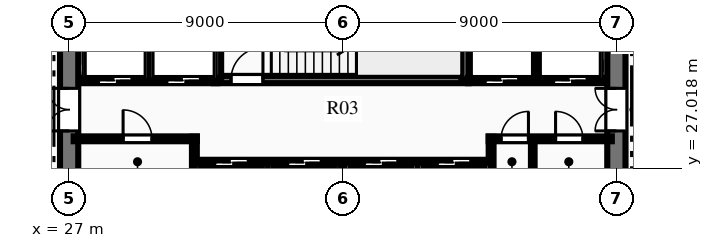
"""IFC4 building model, lengths in metres.
Left out: names, types, materials, properties, quantities, classifications, styles, units other than length and angle.
Written with IfcOpenShell. Run it as: python <this file> out.ifc"""

import sys

from ifc_helpers import new_model, si_unit, direction, frame, frame_2d, origin, place, context, subcontext, project, spatial, rectangle, extrude, element, fill, save


model = new_model("IFC4")
c1 = context("Model", 3, precision=1e-05, world=origin(), true_north=direction((0.0, 1.0)))
c2 = subcontext(c1, "Body", "Model", "MODEL_VIEW")
j1 = project(units=[si_unit("LENGTHUNIT", "METRE"), si_unit("PLANEANGLEUNIT", "RADIAN")], contexts=[c1])
p1 = place(None, origin())
s1 = spatial("IfcSite", under=j1, at=p1, CompositionType="ELEMENT")
p2 = place(p1, origin())
s2 = spatial("IfcBuilding", under=s1, at=p2, CompositionType="ELEMENT")
p3 = place(p2, frame((0.0, 0.0, 32.7)))
s3 = spatial("IfcBuildingStorey", under=s2, at=p3, CompositionType="ELEMENT", Elevation=32.7)
p4 = place(p3, frame((27.0, 18.3, 0.0), z_axis=(0.0, 0.0, 1.0), x_axis=(0.0, 1.0, 0.0)))
e1 = element("IfcWall", 1, at=p4, inside=s3, PredefinedType="SHEAR", context=c2, shape_type="SweptSolid", body=[
    extrude(rectangle(XDim=15.4, YDim=0.6, at=frame_2d((7.7, 0.0))), origin(), (0.0, 0.0, 1.0), 3.75),
])
p5 = place(p4, frame((9.94, 0.0, 0.0)))
e2 = element("IfcOpeningElement", 2, at=p5, cuts=e1, PredefinedType="OPENING", context=c2, shape_type="SweptSolid", body=[
    extrude(rectangle(XDim=1.4, YDim=2.2, at=frame_2d((0.7, 1.1))), frame((0.0, 0.31, 0.0), z_axis=(0.0, -1.0, 0.0), x_axis=(1.0, 0.0, 0.0)), (0.0, 0.0, 1.0), 0.62),
])
p6 = place(p3, frame((45.0, 18.3, 0.0), z_axis=(0.0, 0.0, 1.0), x_axis=(0.0, 1.0, 0.0)))
e3 = element("IfcWall", 3, at=p6, inside=s3, PredefinedType="SHEAR", context=c2, shape_type="SweptSolid", body=[
    extrude(rectangle(XDim=15.4, YDim=0.6, at=frame_2d((7.7, 0.0))), origin(), (0.0, 0.0, 1.0), 3.75),
])
p7 = place(p6, frame((9.94, 0.0, 0.0)))
e4 = element("IfcOpeningElement", 4, at=p7, cuts=e3, PredefinedType="OPENING", context=c2, shape_type="SweptSolid", body=[
    extrude(rectangle(XDim=1.4, YDim=2.2, at=frame_2d((0.7, 1.1))), frame((0.0, 0.31, 0.0), z_axis=(0.0, -1.0, 0.0), x_axis=(1.0, 0.0, 0.0)), (0.0, 0.0, 1.0), 0.62),
])
p8 = place(p3, frame((31.76, 29.93, 0.0), z_axis=(0.0, 0.0, 1.0), x_axis=(1.0, 0.0, 0.0)))
e5 = element("IfcWall", 5, at=p8, inside=s3, PredefinedType="SHEAR", context=c2, shape_type="SweptSolid", body=[
    extrude(rectangle(XDim=8.38, YDim=0.24, at=frame_2d((4.19, 0.0))), origin(), (0.0, 0.0, 1.0), 3.75),
])
p9 = place(p8, frame((0.565, 0.0, 0.0)))
e6 = element("IfcOpeningElement", 6, at=p9, cuts=e5, PredefinedType="OPENING", context=c2, shape_type="SweptSolid", body=[
    extrude(rectangle(XDim=1.05, YDim=2.15, at=frame_2d((0.525, 1.075))), frame((0.0, 0.13, 0.0), z_axis=(0.0, -1.0, 0.0), x_axis=(1.0, 0.0, 0.0)), (0.0, 0.0, 1.0), 0.26),
])
p10 = place(p3, frame((31.88, 29.93, 0.0), z_axis=(0.0, 0.0, 1.0), x_axis=(0.0, 1.0, 0.0)))
e7 = element("IfcWall", 7, at=p10, inside=s3, PredefinedType="SHEAR", context=c2, shape_type="SweptSolid", body=[
    extrude(rectangle(XDim=3.79, YDim=0.24, at=frame_2d((1.895, 0.0))), origin(), (0.0, 0.0, 1.0), 3.75),
])
p11 = place(p3, frame((40.02, 29.93, 0.0), z_axis=(0.0, 0.0, 1.0), x_axis=(0.0, 1.0, 0.0)))
e8 = element("IfcWall", 8, at=p11, inside=s3, PredefinedType="SHEAR", context=c2, shape_type="SweptSolid", body=[
    extrude(rectangle(XDim=3.85, YDim=0.24, at=frame_2d((1.925, 0.0))), origin(), (0.0, 0.0, 1.0), 3.75),
])
p12 = place(p3, frame((27.15, 27.98, 0.0), z_axis=(0.0, 0.0, 1.0), x_axis=(1.0, 0.0, 0.0)))
e9 = element("IfcWall", 9, at=p12, inside=s3, PredefinedType="PARTITIONING", context=c2, shape_type="SweptSolid", body=[
    extrude(rectangle(XDim=4.05, YDim=0.16, at=frame_2d((2.025, 0.0))), origin(), (0.0, 0.0, 1.0), 3.44),
])
p13 = place(p12, frame((1.625, 0.0, 0.0)))
e10 = element("IfcOpeningElement", 10, at=p13, cuts=e9, PredefinedType="OPENING", context=c2, shape_type="SweptSolid", body=[
    extrude(rectangle(XDim=0.95, YDim=2.15, at=frame_2d((0.475, 1.075))), frame((0.0, 0.09, 0.0), z_axis=(0.0, -1.0, 0.0), x_axis=(1.0, 0.0, 0.0)), (0.0, 0.0, 1.0), 0.18),
])
p14 = place(p3, frame((31.12, 26.54, 0.0), z_axis=(0.0, 0.0, 1.0), x_axis=(0.0, 1.0, 0.0)))
e11 = element("IfcWall", 11, at=p14, inside=s3, PredefinedType="PARTITIONING", context=c2, shape_type="SweptSolid", body=[
    extrude(rectangle(XDim=1.51, YDim=0.16, at=frame_2d((0.755, 0.0))), origin(), (0.0, 0.0, 1.0), 3.44),
])
p15 = place(p3, frame((40.8, 27.98, 0.0), z_axis=(0.0, 0.0, 1.0), x_axis=(1.0, 0.0, 0.0)))
e12 = element("IfcWall", 12, at=p15, inside=s3, PredefinedType="PARTITIONING", context=c2, shape_type="SweptSolid", body=[
    extrude(rectangle(XDim=4.05, YDim=0.16, at=frame_2d((2.025, 0.0))), origin(), (0.0, 0.0, 1.0), 3.44),
])
p16 = place(p15, frame((0.407, 0.0, 0.0)))
e13 = element("IfcOpeningElement", 13, at=p16, cuts=e12, PredefinedType="OPENING", context=c2, shape_type="SweptSolid", body=[
    extrude(rectangle(XDim=0.9, YDim=2.15, at=frame_2d((0.45, 1.075))), frame((0.0, 0.09, 0.0), z_axis=(0.0, -1.0, 0.0), x_axis=(1.0, 0.0, 0.0)), (0.0, 0.0, 1.0), 0.18),
])
p17 = place(p15, frame((2.2, 0.0, 0.0)))
e14 = element("IfcOpeningElement", 14, at=p17, cuts=e12, PredefinedType="OPENING", context=c2, shape_type="SweptSolid", body=[
    extrude(rectangle(XDim=0.9, YDim=2.15, at=frame_2d((0.45, 1.075))), frame((0.0, 0.09, 0.0), z_axis=(0.0, -1.0, 0.0), x_axis=(1.0, 0.0, 0.0)), (0.0, 0.0, 1.0), 0.18),
])
p18 = place(p3, frame((40.88, 26.54, 0.0), z_axis=(0.0, 0.0, 1.0), x_axis=(0.0, 1.0, 0.0)))
e15 = element("IfcWall", 15, at=p18, inside=s3, PredefinedType="PARTITIONING", context=c2, shape_type="SweptSolid", body=[
    extrude(rectangle(XDim=1.51, YDim=0.16, at=frame_2d((0.755, 0.0))), origin(), (0.0, 0.0, 1.0), 3.44),
])
p19 = place(p3, frame((42.25, 26.54, 0.0), z_axis=(0.0, 0.0, 1.0), x_axis=(0.0, 1.0, 0.0)))
e16 = element("IfcWall", 16, at=p19, inside=s3, PredefinedType="PARTITIONING", context=c2, shape_type="SweptSolid", body=[
    extrude(rectangle(XDim=1.44, YDim=0.12, at=frame_2d((0.72, 0.0))), origin(), (0.0, 0.0, 1.0), 3.44),
])
p20 = place(p3, frame((27.45, 29.9, 0.0), z_axis=(0.0, 0.0, 1.0), x_axis=(1.0, 0.0, 0.0)))
e17 = element("IfcWall", 17, at=p20, inside=s3, PredefinedType="PARTITIONING", context=c2, shape_type="SweptSolid", body=[
    extrude(rectangle(XDim=4.43, YDim=0.18, at=frame_2d((2.215, 0.0))), origin(), (0.0, 0.0, 1.0), 3.44),
])
p21 = place(p20, frame((0.515, 0.0, 0.0)))
e18 = element("IfcOpeningElement", 18, at=p21, cuts=e17, PredefinedType="OPENING", context=c2, shape_type="SweptSolid", body=[
    extrude(rectangle(XDim=1.1, YDim=2.15, at=frame_2d((0.55, 1.075))), frame((0.0, 0.1, 0.0), z_axis=(0.0, -1.0, 0.0), x_axis=(1.0, 0.0, 0.0)), (0.0, 0.0, 1.0), 0.2),
])
p22 = place(p20, frame((2.765, 0.0, 0.0)))
e19 = element("IfcOpeningElement", 19, at=p22, cuts=e17, PredefinedType="OPENING", context=c2, shape_type="SweptSolid", body=[
    extrude(rectangle(XDim=1.1, YDim=2.15, at=frame_2d((0.55, 1.075))), frame((0.0, 0.1, 0.0), z_axis=(0.0, -1.0, 0.0), x_axis=(1.0, 0.0, 0.0)), (0.0, 0.0, 1.0), 0.2),
])
p23 = place(p3, frame((29.63, 29.9, 0.0), z_axis=(0.0, 0.0, 1.0), x_axis=(0.0, 1.0, 0.0)))
e20 = element("IfcWall", 20, at=p23, inside=s3, PredefinedType="PARTITIONING", context=c2, shape_type="SweptSolid", body=[
    extrude(rectangle(XDim=3.75, YDim=0.18, at=frame_2d((1.875, 0.0))), origin(), (0.0, 0.0, 1.0), 3.44),
])
p24 = place(p3, frame((40.12, 29.9, 0.0), z_axis=(0.0, 0.0, 1.0), x_axis=(1.0, 0.0, 0.0)))
e21 = element("IfcWall", 21, at=p24, inside=s3, PredefinedType="PARTITIONING", context=c2, shape_type="SweptSolid", body=[
    extrude(rectangle(XDim=4.43, YDim=0.18, at=frame_2d((2.215, 0.0))), origin(), (0.0, 0.0, 1.0), 3.44),
])
p25 = place(p24, frame((0.565, 0.0, 0.0)))
e22 = element("IfcOpeningElement", 22, at=p25, cuts=e21, PredefinedType="OPENING", context=c2, shape_type="SweptSolid", body=[
    extrude(rectangle(XDim=1.1, YDim=2.15, at=frame_2d((0.55, 1.075))), frame((0.0, 0.1, 0.0), z_axis=(0.0, -1.0, 0.0), x_axis=(1.0, 0.0, 0.0)), (0.0, 0.0, 1.0), 0.2),
])
p26 = place(p24, frame((2.815, 0.0, 0.0)))
e23 = element("IfcOpeningElement", 23, at=p26, cuts=e21, PredefinedType="OPENING", context=c2, shape_type="SweptSolid", body=[
    extrude(rectangle(XDim=1.1, YDim=2.15, at=frame_2d((0.55, 1.075))), frame((0.0, 0.1, 0.0), z_axis=(0.0, -1.0, 0.0), x_axis=(1.0, 0.0, 0.0)), (0.0, 0.0, 1.0), 0.2),
])
p27 = place(p3, frame((42.37, 29.9, 0.0), z_axis=(0.0, 0.0, 1.0), x_axis=(0.0, 1.0, 0.0)))
e24 = element("IfcWall", 24, at=p27, inside=s3, PredefinedType="PARTITIONING", context=c2, shape_type="SweptSolid", body=[
    extrude(rectangle(XDim=3.75, YDim=0.18, at=frame_2d((1.875, 0.0))), origin(), (0.0, 0.0, 1.0), 3.44),
])
p28 = place(p3, frame((31.2, 27.2, 0.0), z_axis=(0.0, 0.0, 1.0), x_axis=(1.0, 0.0, 0.0)))
e25 = element("IfcWall", 25, at=p28, inside=s3, PredefinedType="PARTITIONING", context=c2, shape_type="SweptSolid", body=[
    extrude(rectangle(XDim=9.6, YDim=0.18, at=frame_2d((4.8, 0.0))), origin(), (0.0, 0.0, 1.0), 3.44),
])
p29 = place(p28, frame((0.59, 0.0, 0.0)))
e26 = element("IfcOpeningElement", 26, at=p29, cuts=e25, PredefinedType="OPENING", context=c2, shape_type="SweptSolid", body=[
    extrude(rectangle(XDim=1.1, YDim=2.15, at=frame_2d((0.55, 1.075))), frame((0.0, 0.1, 0.0), z_axis=(0.0, -1.0, 0.0), x_axis=(1.0, 0.0, 0.0)), (0.0, 0.0, 1.0), 0.2),
])
p30 = place(p28, frame((2.99, 0.0, 0.0)))
e27 = element("IfcOpeningElement", 27, at=p30, cuts=e25, PredefinedType="OPENING", context=c2, shape_type="SweptSolid", body=[
    extrude(rectangle(XDim=1.1, YDim=2.15, at=frame_2d((0.55, 1.075))), frame((0.0, 0.1, 0.0), z_axis=(0.0, -1.0, 0.0), x_axis=(1.0, 0.0, 0.0)), (0.0, 0.0, 1.0), 0.2),
])
p31 = place(p28, frame((5.51, 0.0, 0.0)))
e28 = element("IfcOpeningElement", 28, at=p31, cuts=e25, PredefinedType="OPENING", context=c2, shape_type="SweptSolid", body=[
    extrude(rectangle(XDim=1.1, YDim=2.15, at=frame_2d((0.55, 1.075))), frame((0.0, 0.1, 0.0), z_axis=(0.0, -1.0, 0.0), x_axis=(1.0, 0.0, 0.0)), (0.0, 0.0, 1.0), 0.2),
])
p32 = place(p28, frame((7.91, 0.0, 0.0)))
e29 = element("IfcOpeningElement", 29, at=p32, cuts=e25, PredefinedType="OPENING", context=c2, shape_type="SweptSolid", body=[
    extrude(rectangle(XDim=1.1, YDim=2.15, at=frame_2d((0.55, 1.075))), frame((0.0, 0.1, 0.0), z_axis=(0.0, -1.0, 0.0), x_axis=(1.0, 0.0, 0.0)), (0.0, 0.0, 1.0), 0.2),
])
for number, where, z_axis, x_axis in (
    (30, (33.54, 25.3, 0.0), (0.0, 0.0, 1.0), (0.0, 1.0, 0.0)),
    (31, (36.0, 25.3, 0.0), (0.0, 0.0, 1.0), (0.0, 1.0, 0.0)),
    (32, (38.46, 25.3, 0.0), (0.0, 0.0, 1.0), (0.0, 1.0, 0.0)),
):
    element("IfcWall", number, at=place(p3, frame(where, z_axis=z_axis, x_axis=x_axis)), inside=s3, PredefinedType="PARTITIONING", context=c2, shape_type="SweptSolid", body=[
        extrude(rectangle(XDim=1.9, YDim=0.18, at=frame_2d((0.95, 0.0))), origin(), (0.0, 0.0, 1.0), 3.44),
    ])
p33 = place(p13, origin())
e33 = element("IfcDoor", 33, at=p33, inside=s3, OperationType="SINGLE_SWING_LEFT", PredefinedType="DOOR", context=c2, shape_type="SweptSolid", body=[
    extrude(rectangle(XDim=0.95, YDim=2.15, at=frame_2d((0.475, 1.075))), frame((0.0, 0.025, 0.0), z_axis=(0.0, -1.0, 0.0), x_axis=(1.0, 0.0, 0.0)), (0.0, 0.0, 1.0), 0.05),
])
fill(e10, e33)
p34 = place(p16, origin())
e34 = element("IfcDoor", 34, at=p34, inside=s3, OperationType="SINGLE_SWING_RIGHT", PredefinedType="DOOR", context=c2, shape_type="SweptSolid", body=[
    extrude(rectangle(XDim=0.9, YDim=2.15, at=frame_2d((0.45, 1.075))), frame((0.0, 0.025, 0.0), z_axis=(0.0, -1.0, 0.0), x_axis=(1.0, 0.0, 0.0)), (0.0, 0.0, 1.0), 0.05),
])
fill(e13, e34)
p35 = place(p17, origin())
e35 = element("IfcDoor", 35, at=p35, inside=s3, OperationType="SINGLE_SWING_LEFT", PredefinedType="DOOR", context=c2, shape_type="SweptSolid", body=[
    extrude(rectangle(XDim=0.9, YDim=2.15, at=frame_2d((0.45, 1.075))), frame((0.0, 0.025, 0.0), z_axis=(0.0, -1.0, 0.0), x_axis=(1.0, 0.0, 0.0)), (0.0, 0.0, 1.0), 0.05),
])
fill(e14, e35)
p36 = place(p9, origin())
e36 = element("IfcDoor", 36, at=p36, inside=s3, OperationType="SINGLE_SWING_RIGHT", PredefinedType="DOOR", context=c2, shape_type="SweptSolid", body=[
    extrude(rectangle(XDim=1.05, YDim=2.15, at=frame_2d((0.525, 1.075))), frame((0.0, 0.025, 0.0), z_axis=(0.0, -1.0, 0.0), x_axis=(1.0, 0.0, 0.0)), (0.0, 0.0, 1.0), 0.05),
])
fill(e6, e36)
p37 = place(p5, origin())
e37 = element("IfcDoor", 37, at=p37, inside=s3, OperationType="DOUBLE_DOOR_SINGLE_SWING", PredefinedType="DOOR", context=c2, shape_type="SweptSolid", body=[
    extrude(rectangle(XDim=1.4, YDim=2.2, at=frame_2d((0.7, 1.1))), frame((0.0, 0.025, 0.0), z_axis=(0.0, -1.0, 0.0), x_axis=(1.0, 0.0, 0.0)), (0.0, 0.0, 1.0), 0.05),
])
fill(e2, e37)
p38 = place(p7, origin())
e38 = element("IfcDoor", 38, at=p38, inside=s3, OperationType="DOUBLE_DOOR_SINGLE_SWING", PredefinedType="DOOR", context=c2, shape_type="SweptSolid", body=[
    extrude(rectangle(XDim=1.4, YDim=2.2, at=frame_2d((0.7, 1.1))), frame((0.0, 0.025, 0.0), z_axis=(0.0, -1.0, 0.0), x_axis=(1.0, 0.0, 0.0)), (0.0, 0.0, 1.0), 0.05),
])
fill(e4, e38)
p39 = place(p21, origin())
e39 = element("IfcDoor", 39, at=p39, inside=s3, OperationType="SLIDING_TO_LEFT", PredefinedType="DOOR", context=c2, shape_type="SweptSolid", body=[
    extrude(rectangle(XDim=1.1, YDim=2.15, at=frame_2d((0.55, 1.075))), frame((0.0, 0.025, 0.0), z_axis=(0.0, -1.0, 0.0), x_axis=(1.0, 0.0, 0.0)), (0.0, 0.0, 1.0), 0.05),
])
fill(e18, e39)
p40 = place(p22, origin())
e40 = element("IfcDoor", 40, at=p40, inside=s3, OperationType="SLIDING_TO_LEFT", PredefinedType="DOOR", context=c2, shape_type="SweptSolid", body=[
    extrude(rectangle(XDim=1.1, YDim=2.15, at=frame_2d((0.55, 1.075))), frame((0.0, 0.025, 0.0), z_axis=(0.0, -1.0, 0.0), x_axis=(1.0, 0.0, 0.0)), (0.0, 0.0, 1.0), 0.05),
])
fill(e19, e40)
p41 = place(p25, origin())
e41 = element("IfcDoor", 41, at=p41, inside=s3, OperationType="SLIDING_TO_LEFT", PredefinedType="DOOR", context=c2, shape_type="SweptSolid", body=[
    extrude(rectangle(XDim=1.1, YDim=2.15, at=frame_2d((0.55, 1.075))), frame((0.0, 0.025, 0.0), z_axis=(0.0, -1.0, 0.0), x_axis=(1.0, 0.0, 0.0)), (0.0, 0.0, 1.0), 0.05),
])
fill(e22, e41)
p42 = place(p26, origin())
e42 = element("IfcDoor", 42, at=p42, inside=s3, OperationType="SLIDING_TO_LEFT", PredefinedType="DOOR", context=c2, shape_type="SweptSolid", body=[
    extrude(rectangle(XDim=1.1, YDim=2.15, at=frame_2d((0.55, 1.075))), frame((0.0, 0.025, 0.0), z_axis=(0.0, -1.0, 0.0), x_axis=(1.0, 0.0, 0.0)), (0.0, 0.0, 1.0), 0.05),
])
fill(e23, e42)
p43 = place(p29, origin())
e43 = element("IfcDoor", 43, at=p43, inside=s3, OperationType="SLIDING_TO_LEFT", PredefinedType="DOOR", context=c2, shape_type="SweptSolid", body=[
    extrude(rectangle(XDim=1.1, YDim=2.15, at=frame_2d((0.55, 1.075))), frame((0.0, 0.025, 0.0), z_axis=(0.0, -1.0, 0.0), x_axis=(1.0, 0.0, 0.0)), (0.0, 0.0, 1.0), 0.05),
])
fill(e26, e43)
p44 = place(p30, origin())
e44 = element("IfcDoor", 44, at=p44, inside=s3, OperationType="SLIDING_TO_LEFT", PredefinedType="DOOR", context=c2, shape_type="SweptSolid", body=[
    extrude(rectangle(XDim=1.1, YDim=2.15, at=frame_2d((0.55, 1.075))), frame((0.0, 0.025, 0.0), z_axis=(0.0, -1.0, 0.0), x_axis=(1.0, 0.0, 0.0)), (0.0, 0.0, 1.0), 0.05),
])
fill(e27, e44)
p45 = place(p31, origin())
e45 = element("IfcDoor", 45, at=p45, inside=s3, OperationType="SLIDING_TO_LEFT", PredefinedType="DOOR", context=c2, shape_type="SweptSolid", body=[
    extrude(rectangle(XDim=1.1, YDim=2.15, at=frame_2d((0.55, 1.075))), frame((0.0, 0.025, 0.0), z_axis=(0.0, -1.0, 0.0), x_axis=(1.0, 0.0, 0.0)), (0.0, 0.0, 1.0), 0.05),
])
fill(e28, e45)
p46 = place(p32, origin())
e46 = element("IfcDoor", 46, at=p46, inside=s3, OperationType="SLIDING_TO_LEFT", PredefinedType="DOOR", context=c2, shape_type="SweptSolid", body=[
    extrude(rectangle(XDim=1.1, YDim=2.15, at=frame_2d((0.55, 1.075))), frame((0.0, 0.025, 0.0), z_axis=(0.0, -1.0, 0.0), x_axis=(1.0, 0.0, 0.0)), (0.0, 0.0, 1.0), 0.05),
])
fill(e29, e46)
save(model, sys.argv[1])
